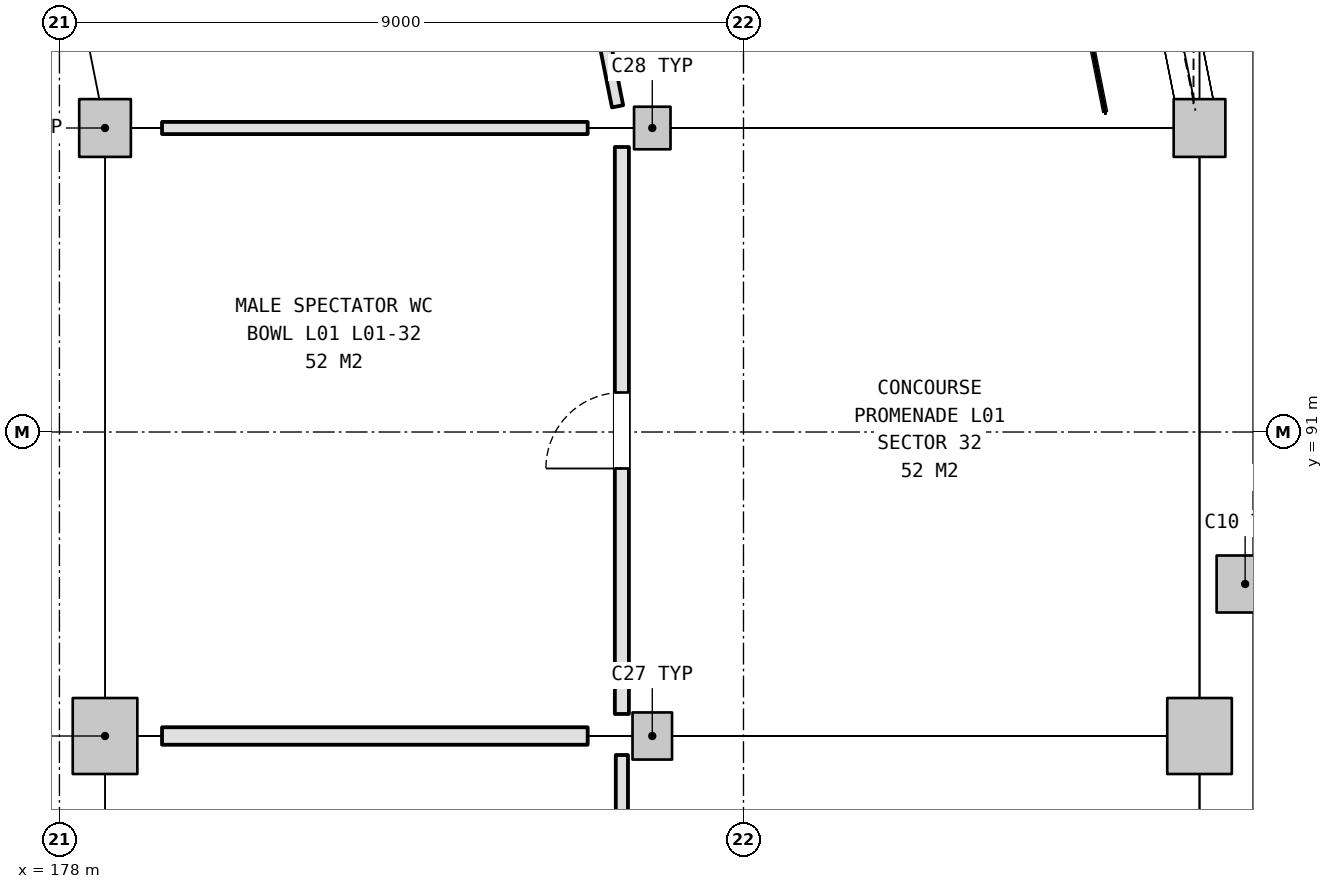
"""IFC4 building model, lengths in metres.
Left out: names, types, materials, properties, quantities, classifications, styles, units other than length and angle.
Written with IfcOpenShell. Run it as: python <this file> out.ifc"""

import sys

from ifc_helpers import new_model, si_unit, direction, frame, frame_2d, origin, origin_2d, place, context, subcontext, project, spatial, rectangle, extrude, element, fill, save


model = new_model("IFC4")
c1 = context("Model", 3, precision=1e-05, world=origin(), true_north=direction((0.0, 1.0)))
c2 = subcontext(c1, "Body", "Model", "MODEL_VIEW")
j1 = project(units=[si_unit("LENGTHUNIT", "METRE"), si_unit("PLANEANGLEUNIT", "RADIAN")], contexts=[c1])
p1 = place(None, origin())
s1 = spatial("IfcSite", under=j1, at=p1, CompositionType="ELEMENT")
p2 = place(p1, origin())
s2 = spatial("IfcBuilding", under=s1, at=p2, CompositionType="ELEMENT")
p3 = place(p2, frame((0.0, 0.0, 5.4)))
s3 = spatial("IfcBuildingStorey", under=s2, at=p3, CompositionType="ELEMENT", Elevation=5.4)
p4 = place(p3, frame((178.6, 87.0, 0.0), z_axis=(0.0, 0.0, 1.0), x_axis=(1.0, 0.0, 0.0)))
e1 = element("IfcColumn", 1, at=p4, inside=s3, PredefinedType="COLUMN", context=c2, shape_type="SweptSolid", body=[
    extrude(rectangle(XDim=0.85, YDim=1.0, at=origin_2d()), origin(), (0.0, 0.0, 1.0), 5.4),
])
p5 = place(p3, frame((185.8, 87.0, 0.0), z_axis=(0.0, 0.0, 1.0), x_axis=(1.0, 0.0, 0.0)))
e2 = element("IfcColumn", 2, at=p5, inside=s3, PredefinedType="COLUMN", context=c2, shape_type="SweptSolid", body=[
    extrude(rectangle(XDim=0.52, YDim=0.62, at=origin_2d()), origin(), (0.0, 0.0, 1.0), 5.4),
])
p6 = place(p3, frame((193.0, 87.0, 0.0), z_axis=(0.0, 0.0, 1.0), x_axis=(1.0, 0.0, 0.0)))
e3 = element("IfcColumn", 3, at=p6, inside=s3, PredefinedType="COLUMN", context=c2, shape_type="SweptSolid", body=[
    extrude(rectangle(XDim=0.85, YDim=1.0, at=origin_2d()), origin(), (0.0, 0.0, 1.0), 5.4),
])
p7 = place(p3, frame((178.6, 95.0, 0.0), z_axis=(0.0, 0.0, 1.0), x_axis=(1.0, 0.0, 0.0)))
e4 = element("IfcColumn", 4, at=p7, inside=s3, PredefinedType="COLUMN", context=c2, shape_type="SweptSolid", body=[
    extrude(rectangle(XDim=0.68, YDim=0.76, at=origin_2d()), origin(), (0.0, 0.0, 1.0), 5.4),
])
p8 = place(p3, frame((185.8, 95.0, 0.0), z_axis=(0.0, 0.0, 1.0), x_axis=(1.0, 0.0, 0.0)))
e5 = element("IfcColumn", 5, at=p8, inside=s3, PredefinedType="COLUMN", context=c2, shape_type="SweptSolid", body=[
    extrude(rectangle(XDim=0.48, YDim=0.56, at=origin_2d()), origin(), (0.0, 0.0, 1.0), 5.4),
])
p9 = place(p3, frame((193.0, 95.0, 0.0), z_axis=(0.0, 0.0, 1.0), x_axis=(1.0, 0.0, 0.0)))
e6 = element("IfcColumn", 6, at=p9, inside=s3, PredefinedType="COLUMN", context=c2, shape_type="SweptSolid", body=[
    extrude(rectangle(XDim=0.68, YDim=0.76, at=origin_2d()), origin(), (0.0, 0.0, 1.0), 5.4),
])
p10 = place(p3, frame((193.6, 89.0, 0.0), z_axis=(0.0, 0.0, 1.0), x_axis=(1.0, 0.0, 0.0)))
e7 = element("IfcColumn", 7, at=p10, inside=s3, PredefinedType="COLUMN", context=c2, shape_type="SweptSolid", body=[
    extrude(rectangle(XDim=0.75, YDim=0.75, at=origin_2d()), origin(), (0.0, 0.0, 1.0), 5.4),
])
p11 = place(p3, frame((185.4, 86.75, 0.0), z_axis=(0.0, 0.0, 1.0), x_axis=(0.0, -1.0, 0.0)))
e8 = element("IfcWall", 8, at=p11, inside=s3, PredefinedType="PARTITIONING", context=c2, shape_type="SweptSolid", body=[
    extrude(rectangle(XDim=7.46, YDim=0.16, at=frame_2d((3.73, 0.0))), origin(), (0.0, 0.0, 1.0), 4.305),
])
p12 = place(p11, frame((3.17, 0.0, 0.0)))
e9 = element("IfcOpeningElement", 9, at=p12, cuts=e8, PredefinedType="OPENING", context=c2, shape_type="SweptSolid", body=[
    extrude(rectangle(XDim=1.12, YDim=2.2, at=frame_2d((0.56, 1.1))), frame((0.0, 0.09, 0.0), z_axis=(0.0, -1.0, 0.0), x_axis=(1.0, 0.0, 0.0)), (0.0, 0.0, 1.0), 0.18),
])
p13 = place(p3, frame((179.35, 87.0, 0.0), z_axis=(0.0, 0.0, 1.0), x_axis=(1.0, 0.0, 0.0)))
e10 = element("IfcWall", 10, at=p13, inside=s3, PredefinedType="PLUMBINGWALL", context=c2, shape_type="SweptSolid", body=[
    extrude(rectangle(XDim=5.6, YDim=0.23, at=frame_2d((2.8, 0.0))), origin(), (0.0, 0.0, 1.0), 4.345),
])
p14 = place(p3, frame((185.4, 94.75, 0.0), z_axis=(0.0, 0.0, 1.0), x_axis=(0.0, -1.0, 0.0)))
e11 = element("IfcWall", 11, at=p14, inside=s3, PredefinedType="PARTITIONING", context=c2, shape_type="SweptSolid", body=[
    extrude(rectangle(XDim=7.46, YDim=0.185, at=frame_2d((3.73, 0.0))), origin(), (0.0, 0.0, 1.0), 4.345),
])
p15 = place(p14, frame((3.23, 0.0, 0.0)))
e12 = element("IfcOpeningElement", 12, at=p15, cuts=e11, PredefinedType="OPENING", context=c2, shape_type="SweptSolid", body=[
    extrude(rectangle(XDim=1.0, YDim=2.15, at=frame_2d((0.5, 1.075))), frame((0.0, 0.103, 0.0), z_axis=(0.0, -1.0, 0.0), x_axis=(1.0, 0.0, 0.0)), (0.0, 0.0, 1.0), 0.205),
])
p16 = place(p3, frame((179.35, 95.0, 0.0), z_axis=(0.0, 0.0, 1.0), x_axis=(1.0, 0.0, 0.0)))
e13 = element("IfcWall", 13, at=p16, inside=s3, PredefinedType="PARTITIONING", context=c2, shape_type="SweptSolid", body=[
    extrude(rectangle(XDim=5.6, YDim=0.16, at=frame_2d((2.8, 0.0))), origin(), (0.0, 0.0, 1.0), 4.375),
])
p17 = place(p3, frame((182.069, 111.746, 0.0), z_axis=(0.0, 0.0, 1.0), x_axis=(0.195086564225, -0.980786027867, 0.0)))
e14 = element("IfcWall", 14, at=p17, inside=s3, PredefinedType="PARTITIONING", context=c2, shape_type="SweptSolid", body=[
    extrude(rectangle(XDim=16.783, YDim=0.15, at=frame_2d((8.392, 0.0))), origin(), (0.0, 0.0, 1.0), 4.375),
])
p18 = place(p17, frame((7.842, 0.0, 0.0)))
e15 = element("IfcOpeningElement", 15, at=p18, cuts=e14, PredefinedType="OPENING", context=c2, shape_type="SweptSolid", body=[
    extrude(rectangle(XDim=1.1, YDim=2.15, at=frame_2d((0.55, 1.075))), frame((0.0, 0.085, 0.0), z_axis=(0.0, -1.0, 0.0), x_axis=(1.0, 0.0, 0.0)), (0.0, 0.0, 1.0), 0.17),
])
p19 = place(p15, frame((1.0, 0.0, 0.0), z_axis=(0.0, 0.0, 1.0), x_axis=(-1.0, 0.0, 0.0)))
e16 = element("IfcDoor", 16, at=p19, inside=s3, OperationType="SINGLE_SWING_RIGHT", PredefinedType="DOOR", context=c2, shape_type="SweptSolid", body=[
    extrude(rectangle(XDim=1.0, YDim=2.15, at=frame_2d((0.5, 1.075))), frame((0.0, 0.025, 0.0), z_axis=(0.0, -1.0, 0.0), x_axis=(1.0, 0.0, 0.0)), (0.0, 0.0, 1.0), 0.05),
])
fill(e12, e16)
save(model, sys.argv[1])
